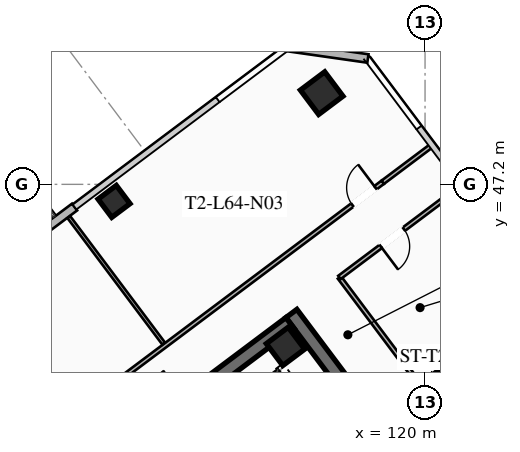
"""IFC4 building model, lengths in metres.
Left out: names, types, materials, properties, quantities, classifications, styles, units other than length and angle.
Written with IfcOpenShell. Run it as: python <this file> out.ifc"""

import sys

from ifc_helpers import new_model, si_unit, direction, frame, frame_2d, origin, origin_2d, place, context, subcontext, project, spatial, rectangle, hollow_rectangle, extrude, element, fill, save


model = new_model("IFC4")
c1 = context("Model", 3, precision=1e-05, world=origin(), true_north=direction((0.0, 1.0)))
c2 = subcontext(c1, "Body", "Model", "MODEL_VIEW")
j1 = project(units=[si_unit("LENGTHUNIT", "METRE"), si_unit("PLANEANGLEUNIT", "RADIAN")], contexts=[c1])
p1 = place(None, origin())
s1 = spatial("IfcSite", under=j1, at=p1, CompositionType="ELEMENT")
p2 = place(p1, origin())
s2 = spatial("IfcBuilding", under=s1, at=p2, CompositionType="ELEMENT")
p3 = place(p2, frame((0.0, 0.0, 236.15)))
s3 = spatial("IfcBuildingStorey", under=s2, at=p3, CompositionType="ELEMENT", Elevation=236.15)
p4 = place(p3, frame((115.604, 42.953, 0.0), z_axis=(0.0, 0.0, 1.0), x_axis=(0.600005007985, -0.799996243986, 0.0)))
e1 = element("IfcWall", 1, at=p4, inside=s3, PredefinedType="SHEAR", context=c2, shape_type="SweptSolid", body=[
    extrude(rectangle(XDim=15.6, YDim=0.45, at=frame_2d((7.8, 0.0))), origin(), (0.0, 0.0, 1.0), 3.55),
])
p5 = place(p3, frame((103.351, 33.482, 0.0), z_axis=(0.0, 0.0, 1.0), x_axis=(0.8, 0.6, 0.0)))
e2 = element("IfcWall", 2, at=p5, inside=s3, PredefinedType="SHEAR", context=c2, shape_type="SweptSolid", body=[
    extrude(rectangle(XDim=15.26, YDim=0.45, at=frame_2d((7.63, 0.0))), origin(), (0.0, 0.0, 1.0), 3.55),
])
p6 = place(p5, frame((4.68, 0.0, 0.0)))
e3 = element("IfcOpeningElement", 3, at=p6, cuts=e2, PredefinedType="OPENING", context=c2, shape_type="SweptSolid", body=[
    extrude(rectangle(XDim=1.25, YDim=2.25, at=frame_2d((0.625, 1.125))), frame((0.0, 0.235, 0.0), z_axis=(0.0, -1.0, 0.0), x_axis=(1.0, 0.0, 0.0)), (0.0, 0.0, 1.0), 0.47),
])
p7 = place(p5, frame((9.73, 0.0, 0.0)))
e4 = element("IfcOpeningElement", 4, at=p7, cuts=e2, PredefinedType="OPENING", context=c2, shape_type="SweptSolid", body=[
    extrude(rectangle(XDim=1.25, YDim=2.25, at=frame_2d((0.625, 1.125))), frame((0.0, 0.235, 0.0), z_axis=(0.0, -1.0, 0.0), x_axis=(1.0, 0.0, 0.0)), (0.0, 0.0, 1.0), 0.47),
])
p8 = place(p3, frame((115.41, 41.87, 0.0), z_axis=(0.0, 0.0, 1.0), x_axis=(0.799999996291, 0.600000004945, 0.0)))
e5 = element("IfcColumn", 5, at=p8, inside=s3, PredefinedType="COLUMN", context=c2, shape_type="SweptSolid", body=[
    extrude(hollow_rectangle(XDim=0.9, YDim=0.9, WallThickness=0.04, at=origin_2d()), origin(), (0.0, 0.0, 1.0), 3.37),
])
p9 = place(p3, frame((116.6, 50.2, 0.0), z_axis=(0.0, 0.0, 1.0), x_axis=(0.799999996291, 0.600000004945, 0.0)))
e6 = element("IfcColumn", 6, at=p9, inside=s3, PredefinedType="COLUMN", context=c2, shape_type="SweptSolid", body=[
    extrude(hollow_rectangle(XDim=1.0, YDim=1.0, WallThickness=0.04, at=origin_2d()), origin(), (0.0, 0.0, 1.0), 3.37),
])
p10 = place(p3, frame((109.77, 46.64, 0.0), z_axis=(0.0, 0.0, 1.0), x_axis=(0.799999996291, 0.600000004945, 0.0)))
e7 = element("IfcColumn", 7, at=p10, inside=s3, PredefinedType="COLUMN", context=c2, shape_type="SweptSolid", body=[
    extrude(hollow_rectangle(XDim=0.75, YDim=0.75, WallThickness=0.032, at=origin_2d()), origin(), (0.0, 0.0, 1.0), 3.37),
])
p11 = place(p3, frame((101.672, 41.354, 0.0), z_axis=(0.0, 0.0, 1.0), x_axis=(0.799986212866, 0.600018382406, 0.0)))
e8 = element("IfcWall", 8, at=p11, inside=s3, PredefinedType="SOLIDWALL", context=c2, shape_type="SweptSolid", body=[
    extrude(rectangle(XDim=8.5, YDim=0.28, at=frame_2d((4.25, 0.0))), origin(), (0.0, 0.0, 1.0), 3.37),
])
p12 = place(p11, frame((3.6, 0.0, 0.0)))
e9 = element("IfcOpeningElement", 9, at=p12, cuts=e8, PredefinedType="OPENING", context=c2, shape_type="SweptSolid", body=[
    extrude(rectangle(XDim=1.3, YDim=2.15, at=frame_2d((0.65, 1.075))), frame((0.0, 0.15, 0.0), z_axis=(0.0, -1.0, 0.0), x_axis=(1.0, 0.0, 0.0)), (0.0, 0.0, 1.0), 0.3),
])
p13 = place(p11, frame((1.46, 0.0, 0.85)))
e10 = element("IfcOpeningElement", 10, at=p13, cuts=e8, PredefinedType="OPENING", context=c2, shape_type="SweptSolid", body=[
    extrude(rectangle(XDim=1.8, YDim=1.92, at=frame_2d((0.9, 0.96))), frame((0.0, 0.15, 0.0), z_axis=(0.0, -1.0, 0.0), x_axis=(1.0, 0.0, 0.0)), (0.0, 0.0, 1.0), 0.3),
])
p14 = place(p3, frame((115.46, 51.72, 0.0), z_axis=(0.0, 0.0, 1.0), x_axis=(0.989956760759, -0.141370477216, 0.0)))
e11 = element("IfcWall", 11, at=p14, inside=s3, PredefinedType="SOLIDWALL", context=c2, shape_type="SweptSolid", body=[
    extrude(rectangle(XDim=2.687, YDim=0.28, at=frame_2d((1.344, 0.0))), origin(), (0.0, 0.0, 1.0), 3.37),
])
p15 = place(p3, frame((121.204, 41.528, 0.0), z_axis=(0.0, 0.0, 1.0), x_axis=(-0.800017232136, -0.599977023131, 0.0)))
e12 = element("IfcWall", 12, at=p15, inside=s3, PredefinedType="SHEAR", context=c2, shape_type="SweptSolid", body=[
    extrude(rectangle(XDim=3.4, YDim=0.2, at=frame_2d((1.7, 0.0))), origin(), (0.0, 0.0, 1.0), 3.37),
])
p16 = place(p15, frame((1.975, 0.0, 0.0)))
e13 = element("IfcOpeningElement", 13, at=p16, cuts=e12, PredefinedType="OPENING", context=c2, shape_type="SweptSolid", body=[
    extrude(rectangle(XDim=1.15, YDim=2.2, at=frame_2d((0.575, 1.1))), frame((0.0, 0.11, 0.0), z_axis=(0.0, -1.0, 0.0), x_axis=(1.0, 0.0, 0.0)), (0.0, 0.0, 1.0), 0.22),
])
p17 = place(p3, frame((119.824, 40.618, 0.0), z_axis=(0.0, 0.0, 1.0), x_axis=(-0.599982243973, 0.800013316712, 0.0)))
e14 = element("IfcWall", 14, at=p17, inside=s3, PredefinedType="PARTITIONING", context=c2, shape_type="SweptSolid", body=[
    extrude(rectangle(XDim=4.4, YDim=0.135, at=frame_2d((2.2, 0.0))), origin(), (0.0, 0.0, 1.0), 2.723),
])
p18 = place(p3, frame((99.746, 33.122, 0.0), z_axis=(0.0, 0.0, 1.0), x_axis=(0.800001242445, 0.599998343403, 0.0)))
e15 = element("IfcWall", 15, at=p18, inside=s3, PredefinedType="PARTITIONING", context=c2, shape_type="SweptSolid", body=[
    extrude(rectangle(XDim=23.58, YDim=0.135, at=frame_2d((11.79, 0.0))), origin(), (0.0, 0.0, 1.0), 2.723),
])
p19 = place(p18, frame((0.3, 0.0, 0.0)))
e16 = element("IfcOpeningElement", 16, at=p19, cuts=e15, PredefinedType="OPENING", context=c2, shape_type="SweptSolid", body=[
    extrude(rectangle(XDim=0.95, YDim=2.05, at=frame_2d((0.475, 1.025))), frame((0.0, 0.077, 0.0), z_axis=(0.0, -1.0, 0.0), x_axis=(1.0, 0.0, 0.0)), (0.0, 0.0, 1.0), 0.155),
])
p20 = place(p18, frame((10.512, 0.0, 0.0)))
e17 = element("IfcOpeningElement", 17, at=p20, cuts=e15, PredefinedType="OPENING", context=c2, shape_type="SweptSolid", body=[
    extrude(rectangle(XDim=0.95, YDim=2.05, at=frame_2d((0.475, 1.025))), frame((0.0, 0.077, 0.0), z_axis=(0.0, -1.0, 0.0), x_axis=(1.0, 0.0, 0.0)), (0.0, 0.0, 1.0), 0.155),
])
p21 = place(p18, frame((22.33, 0.0, 0.0)))
e18 = element("IfcOpeningElement", 18, at=p21, cuts=e15, PredefinedType="OPENING", context=c2, shape_type="SweptSolid", body=[
    extrude(rectangle(XDim=0.95, YDim=2.05, at=frame_2d((0.475, 1.025))), frame((0.0, 0.077, 0.0), z_axis=(0.0, -1.0, 0.0), x_axis=(1.0, 0.0, 0.0)), (0.0, 0.0, 1.0), 0.155),
])
p22 = place(p3, frame((118.61, 47.27, 0.0), z_axis=(0.0, 0.0, 1.0), x_axis=(0.799956698502, 0.600057730991, 0.0)))
e19 = element("IfcWall", 19, at=p22, inside=s3, PredefinedType="PARTITIONING", context=c2, shape_type="SweptSolid", body=[
    extrude(rectangle(XDim=2.03, YDim=0.135, at=frame_2d((1.015, 0.0))), origin(), (0.0, 0.0, 1.0), 2.723),
])
p23 = place(p3, frame((111.402, 41.964, 0.0), z_axis=(0.0, 0.0, 1.0), x_axis=(-0.60002253582, 0.799983097639, 0.0)))
e20 = element("IfcWall", 20, at=p23, inside=s3, PredefinedType="PARTITIONING", context=c2, shape_type="SweptSolid", body=[
    extrude(rectangle(XDim=5.2, YDim=0.11, at=frame_2d((2.6, 0.0))), origin(), (0.0, 0.0, 1.0), 2.723),
])
p24 = place(p3, frame((121.224, 47.168, 0.0), z_axis=(0.0, 0.0, 1.0), x_axis=(-0.8, -0.6, 0.0)))
e21 = element("IfcWall", 21, at=p24, inside=s3, PredefinedType="PARTITIONING", context=c2, shape_type="SweptSolid", body=[
    extrude(rectangle(XDim=5.05, YDim=0.135, at=frame_2d((2.525, 0.0))), origin(), (0.0, 0.0, 1.0), 2.723),
])
p25 = place(p24, frame((2.4, 0.0, 0.0)))
e22 = element("IfcOpeningElement", 22, at=p25, cuts=e21, PredefinedType="OPENING", context=c2, shape_type="SweptSolid", body=[
    extrude(rectangle(XDim=0.95, YDim=2.05, at=frame_2d((0.475, 1.025))), frame((0.0, 0.077, 0.0), z_axis=(0.0, -1.0, 0.0), x_axis=(1.0, 0.0, 0.0)), (0.0, 0.0, 1.0), 0.155),
])
p26 = place(p21, origin())
e23 = element("IfcDoor", 23, at=p26, inside=s3, OperationType="SINGLE_SWING_RIGHT", PredefinedType="DOOR", context=c2, shape_type="SweptSolid", body=[
    extrude(rectangle(XDim=0.95, YDim=2.05, at=frame_2d((0.475, 1.025))), frame((0.0, 0.025, 0.0), z_axis=(0.0, -1.0, 0.0), x_axis=(1.0, 0.0, 0.0)), (0.0, 0.0, 1.0), 0.05),
])
fill(e18, e23)
p27 = place(p25, origin())
e24 = element("IfcDoor", 24, at=p27, inside=s3, OperationType="SINGLE_SWING_RIGHT", PredefinedType="DOOR", context=c2, shape_type="SweptSolid", body=[
    extrude(rectangle(XDim=0.95, YDim=2.05, at=frame_2d((0.475, 1.025))), frame((0.0, 0.025, 0.0), z_axis=(0.0, -1.0, 0.0), x_axis=(1.0, 0.0, 0.0)), (0.0, 0.0, 1.0), 0.05),
])
fill(e22, e24)
save(model, sys.argv[1])
